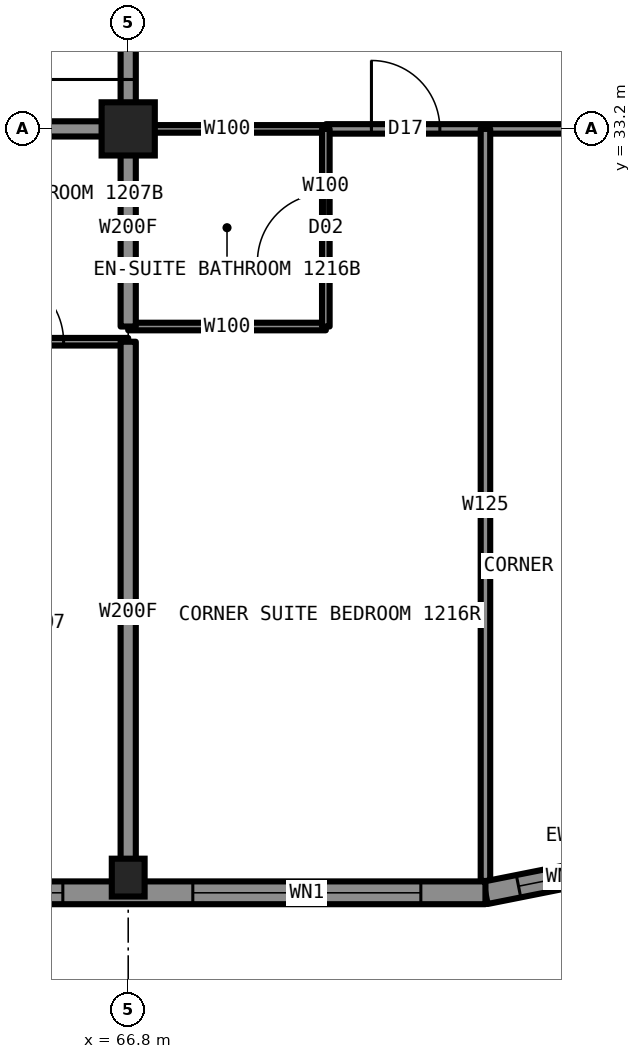
"""IFC4 building model, lengths in metres.
Left out: names, types, materials, properties, quantities, classifications, styles, units other than length and angle.
Written with IfcOpenShell. Run it as: python <this file> out.ifc"""

import sys

from ifc_helpers import new_model, si_unit, direction, frame, frame_2d, origin, origin_2d, place, context, subcontext, project, spatial, rectangle, hollow_rectangle, i_section, extrude, element, fill, save


model = new_model("IFC4")
c1 = context("Model", 3, precision=1e-05, world=origin(), true_north=direction((0.0, 1.0)))
c2 = subcontext(c1, "Body", "Model", "MODEL_VIEW")
j1 = project(units=[si_unit("LENGTHUNIT", "METRE"), si_unit("PLANEANGLEUNIT", "RADIAN")], contexts=[c1])
p1 = place(None, origin())
s1 = spatial("IfcSite", under=j1, at=p1, CompositionType="ELEMENT")
p2 = place(p1, origin())
s2 = spatial("IfcBuilding", under=s1, at=p2, CompositionType="ELEMENT")
p3 = place(p2, frame((0.0, 0.0, 49.5)))
s3 = spatial("IfcBuildingStorey", under=s2, at=p3, CompositionType="ELEMENT", Elevation=49.5)
p4 = place(p3, frame((66.8, 23.35, 0.0), z_axis=(0.0, 0.0, 1.0), x_axis=(1.0, 0.0, 0.0)))
e1 = element("IfcColumn", 1, at=p4, inside=s3, PredefinedType="COLUMN", context=c2, shape_type="SweptSolid", body=[
    extrude(i_section(OverallWidth=0.432, OverallDepth=0.498, WebThickness=0.056, FlangeThickness=0.089, at=origin_2d()), origin(), (0.0, 0.0, 1.0), 3.5),
])
p5 = place(p3, frame((66.8, 33.2, 0.0), z_axis=(0.0, 0.0, 1.0), x_axis=(1.0, 0.0, 0.0)))
e2 = element("IfcColumn", 2, at=p5, inside=s3, PredefinedType="COLUMN", context=c2, shape_type="SweptSolid", body=[
    extrude(hollow_rectangle(XDim=0.7, YDim=0.7, WallThickness=0.06, at=origin_2d()), origin(), (0.0, 0.0, 1.0), 3.5),
])
p6 = place(p3, frame((66.8, 33.2, 0.0), z_axis=(0.0, 0.0, 1.0), x_axis=(1.0, 0.0, 0.0)))
e3 = element("IfcWall", 3, at=p6, inside=s3, PredefinedType="PARTITIONING", context=c2, shape_type="SweptSolid", body=[
    extrude(rectangle(XDim=2.6, YDim=0.1, at=frame_2d((1.3, 0.0))), origin(), (0.0, 0.0, 1.0), 2.573),
])
p7 = place(p3, frame((43.2, 33.2, 0.0), z_axis=(0.0, 0.0, 1.0), x_axis=(1.0, 0.0, 0.0)))
e4 = element("IfcWall", 4, at=p7, inside=s3, PredefinedType="PARTITIONING", context=c2, shape_type="SweptSolid", body=[
    extrude(rectangle(XDim=23.6, YDim=0.2, at=frame_2d((11.8, 0.0))), origin(), (0.0, 0.0, 1.0), 3.33),
])
p8 = place(p7, frame((3.0, 0.0, 0.0)))
e5 = element("IfcOpeningElement", 5, at=p8, cuts=e4, PredefinedType="OPENING", context=c2, shape_type="SweptSolid", body=[
    extrude(rectangle(XDim=1.0, YDim=2.2, at=frame_2d((0.5, 1.1))), frame((0.0, 0.11, 0.0), z_axis=(0.0, -1.0, 0.0), x_axis=(1.0, 0.0, 0.0)), (0.0, 0.0, 1.0), 0.22),
])
p9 = place(p7, frame((12.44, 0.0, 0.0)))
e6 = element("IfcOpeningElement", 6, at=p9, cuts=e4, PredefinedType="OPENING", context=c2, shape_type="SweptSolid", body=[
    extrude(rectangle(XDim=1.0, YDim=2.2, at=frame_2d((0.5, 1.1))), frame((0.0, 0.11, 0.0), z_axis=(0.0, -1.0, 0.0), x_axis=(1.0, 0.0, 0.0)), (0.0, 0.0, 1.0), 0.22),
])
p10 = place(p7, frame((19.28, 0.0, 0.0)))
e7 = element("IfcOpeningElement", 7, at=p10, cuts=e4, PredefinedType="OPENING", context=c2, shape_type="SweptSolid", body=[
    extrude(rectangle(XDim=1.0, YDim=2.2, at=frame_2d((0.5, 1.1))), frame((0.0, 0.11, 0.0), z_axis=(0.0, -1.0, 0.0), x_axis=(1.0, 0.0, 0.0)), (0.0, 0.0, 1.0), 0.22),
])
p11 = place(p3, frame((69.4, 33.2, 0.0), z_axis=(0.0, 0.0, 1.0), x_axis=(1.0, 0.0, 0.0)))
e8 = element("IfcWall", 8, at=p11, inside=s3, PredefinedType="PARTITIONING", context=c2, shape_type="SweptSolid", body=[
    extrude(rectangle(XDim=7.3, YDim=0.125, at=frame_2d((3.65, 0.0))), origin(), (0.0, 0.0, 1.0), 2.573),
])
p12 = place(p11, frame((0.6, 0.0, 0.0)))
e9 = element("IfcOpeningElement", 9, at=p12, cuts=e8, PredefinedType="OPENING", context=c2, shape_type="SweptSolid", body=[
    extrude(rectangle(XDim=0.9, YDim=2.2, at=frame_2d((0.45, 1.1))), frame((0.0, 0.073, 0.0), z_axis=(0.0, -1.0, 0.0), x_axis=(1.0, 0.0, 0.0)), (0.0, 0.0, 1.0), 0.145),
])
p13 = place(p11, frame((4.4, 0.0, 0.0)))
e10 = element("IfcOpeningElement", 10, at=p13, cuts=e8, PredefinedType="OPENING", context=c2, shape_type="SweptSolid", body=[
    extrude(rectangle(XDim=0.9, YDim=2.2, at=frame_2d((0.45, 1.1))), frame((0.0, 0.073, 0.0), z_axis=(0.0, -1.0, 0.0), x_axis=(1.0, 0.0, 0.0)), (0.0, 0.0, 1.0), 0.145),
])
p14 = place(p3, frame((66.8, 30.6, 0.0), z_axis=(0.0, 0.0, 1.0), x_axis=(1.0, 0.0, 0.0)))
e11 = element("IfcWall", 11, at=p14, inside=s3, PredefinedType="PARTITIONING", context=c2, shape_type="SweptSolid", body=[
    extrude(rectangle(XDim=2.6, YDim=0.1, at=frame_2d((1.3, 0.0))), origin(), (0.0, 0.0, 1.0), 3.33),
])
p15 = place(p3, frame((64.2, 30.4, 0.0), z_axis=(0.0, 0.0, 1.0), x_axis=(1.0, 0.0, 0.0)))
e12 = element("IfcWall", 12, at=p15, inside=s3, PredefinedType="PARTITIONING", context=c2, shape_type="SweptSolid", body=[
    extrude(rectangle(XDim=2.6, YDim=0.1, at=frame_2d((1.3, 0.0))), origin(), (0.0, 0.0, 1.0), 3.33),
])
p16 = place(p15, frame((0.85, 0.0, 0.0)))
e13 = element("IfcOpeningElement", 13, at=p16, cuts=e12, PredefinedType="OPENING", context=c2, shape_type="SweptSolid", body=[
    extrude(rectangle(XDim=0.9, YDim=2.1, at=frame_2d((0.45, 1.05))), frame((0.0, 0.06, 0.0), z_axis=(0.0, -1.0, 0.0), x_axis=(1.0, 0.0, 0.0)), (0.0, 0.0, 1.0), 0.12),
])
p17 = place(p3, frame((66.8, 33.2, 0.0), z_axis=(0.0, 0.0, 1.0), x_axis=(0.0, 1.0, 0.0)))
e14 = element("IfcWall", 14, at=p17, inside=s3, PredefinedType="PARTITIONING", context=c2, shape_type="SweptSolid", body=[
    extrude(rectangle(XDim=4.72, YDim=0.2, at=frame_2d((2.36, 0.0))), origin(), (0.0, 0.0, 1.0), 3.33),
])
p18 = place(p17, frame((0.65, 0.0, 0.0)))
e15 = element("IfcOpeningElement", 15, at=p18, cuts=e14, PredefinedType="OPENING", context=c2, shape_type="SweptSolid", body=[
    extrude(rectangle(XDim=1.1, YDim=2.2, at=frame_2d((0.55, 1.1))), frame((0.0, 0.11, 0.0), z_axis=(0.0, -1.0, 0.0), x_axis=(1.0, 0.0, 0.0)), (0.0, 0.0, 1.0), 0.22),
])
p19 = place(p3, frame((66.8, 23.3, 0.0), z_axis=(0.0, 0.0, 1.0), x_axis=(0.0, 1.0, 0.0)))
e16 = element("IfcWall", 16, at=p19, inside=s3, PredefinedType="PARTITIONING", context=c2, shape_type="SweptSolid", body=[
    extrude(rectangle(XDim=7.1, YDim=0.2, at=frame_2d((3.55, 0.0))), origin(), (0.0, 0.0, 1.0), 2.573),
])
p20 = place(p3, frame((66.8, 30.6, 0.0), z_axis=(0.0, 0.0, 1.0), x_axis=(0.0, 1.0, 0.0)))
e17 = element("IfcWall", 17, at=p20, inside=s3, PredefinedType="PARTITIONING", context=c2, shape_type="SweptSolid", body=[
    extrude(rectangle(XDim=2.6, YDim=0.2, at=frame_2d((1.3, 0.0))), origin(), (0.0, 0.0, 1.0), 2.573),
])
p21 = place(p3, frame((69.4, 30.6, 0.0), z_axis=(0.0, 0.0, 1.0), x_axis=(0.0, 1.0, 0.0)))
e18 = element("IfcWall", 18, at=p21, inside=s3, PredefinedType="PARTITIONING", context=c2, shape_type="SweptSolid", body=[
    extrude(rectangle(XDim=2.6, YDim=0.1, at=frame_2d((1.3, 0.0))), origin(), (0.0, 0.0, 1.0), 3.33),
])
p22 = place(p21, frame((0.85, 0.0, 0.0)))
e19 = element("IfcOpeningElement", 19, at=p22, cuts=e18, PredefinedType="OPENING", context=c2, shape_type="SweptSolid", body=[
    extrude(rectangle(XDim=0.9, YDim=2.1, at=frame_2d((0.45, 1.05))), frame((0.0, 0.06, 0.0), z_axis=(0.0, -1.0, 0.0), x_axis=(1.0, 0.0, 0.0)), (0.0, 0.0, 1.0), 0.12),
])
p23 = place(p3, frame((71.5, 23.306, 0.0), z_axis=(0.0, 0.0, 1.0), x_axis=(0.0, 1.0, 0.0)))
e20 = element("IfcWall", 20, at=p23, inside=s3, PredefinedType="PARTITIONING", context=c2, shape_type="SweptSolid", body=[
    extrude(rectangle(XDim=9.894, YDim=0.125, at=frame_2d((4.947, 0.0))), origin(), (0.0, 0.0, 1.0), 3.33),
])
p24 = place(p3, frame((71.5, 23.15, 0.0), z_axis=(0.0, 0.0, 1.0), x_axis=(0.980787050784, 0.195081421501, 0.0)))
e21 = element("IfcWall", 21, at=p24, inside=s3, PredefinedType="SOLIDWALL", context=c2, shape_type="SweptSolid", body=[
    extrude(rectangle(XDim=2.087, YDim=0.3, at=frame_2d((1.044, 0.0))), origin(), (0.0, 0.0, 1.0), 3.33),
])
p25 = place(p24, frame((0.444, 0.0, 0.5)))
e22 = element("IfcOpeningElement", 22, at=p25, cuts=e21, PredefinedType="OPENING", context=c2, shape_type="SweptSolid", body=[
    extrude(rectangle(XDim=1.2, YDim=2.0, at=frame_2d((0.6, 1.0))), frame((0.0, 0.16, 0.0), z_axis=(0.0, -1.0, 0.0), x_axis=(1.0, 0.0, 0.0)), (0.0, 0.0, 1.0), 0.32),
])
p26 = place(p3, frame((38.5, 23.15, 0.0), z_axis=(0.0, 0.0, 1.0), x_axis=(1.0, 0.0, 0.0)))
e23 = element("IfcWall", 23, at=p26, inside=s3, PredefinedType="SOLIDWALL", context=c2, shape_type="SweptSolid", body=[
    extrude(rectangle(XDim=33.0, YDim=0.3, at=frame_2d((16.5, 0.0))), origin(), (0.0, 0.0, 1.0), 2.83),
])
p27 = place(p26, frame((0.85, 0.0, 0.5)))
e24 = element("IfcOpeningElement", 24, at=p27, cuts=e23, PredefinedType="OPENING", context=c2, shape_type="SweptSolid", body=[
    extrude(rectangle(XDim=3.0, YDim=2.0, at=frame_2d((1.5, 1.0))), frame((0.0, 0.16, 0.0), z_axis=(0.0, -1.0, 0.0), x_axis=(1.0, 0.0, 0.0)), (0.0, 0.0, 1.0), 0.32),
])
p28 = place(p26, frame((5.56, 0.0, 0.5)))
e25 = element("IfcOpeningElement", 25, at=p28, cuts=e23, PredefinedType="OPENING", context=c2, shape_type="SweptSolid", body=[
    extrude(rectangle(XDim=3.0, YDim=2.0, at=frame_2d((1.5, 1.0))), frame((0.0, 0.16, 0.0), z_axis=(0.0, -1.0, 0.0), x_axis=(1.0, 0.0, 0.0)), (0.0, 0.0, 1.0), 0.32),
])
p29 = place(p26, frame((10.28, 0.0, 1.1)))
e26 = element("IfcOpeningElement", 26, at=p29, cuts=e23, PredefinedType="OPENING", context=c2, shape_type="SweptSolid", body=[
    extrude(rectangle(XDim=1.1, YDim=1.4, at=frame_2d((0.55, 0.7))), frame((0.0, 0.16, 0.0), z_axis=(0.0, -1.0, 0.0), x_axis=(1.0, 0.0, 0.0)), (0.0, 0.0, 1.0), 0.32),
])
p30 = place(p26, frame((15.0, 0.0, 0.5)))
e27 = element("IfcOpeningElement", 27, at=p30, cuts=e23, PredefinedType="OPENING", context=c2, shape_type="SweptSolid", body=[
    extrude(rectangle(XDim=3.0, YDim=2.0, at=frame_2d((1.5, 1.0))), frame((0.0, 0.16, 0.0), z_axis=(0.0, -1.0, 0.0), x_axis=(1.0, 0.0, 0.0)), (0.0, 0.0, 1.0), 0.32),
])
p31 = place(p26, frame((21.62, 0.0, 1.1)))
e28 = element("IfcOpeningElement", 28, at=p31, cuts=e23, PredefinedType="OPENING", context=c2, shape_type="SweptSolid", body=[
    extrude(rectangle(XDim=1.1, YDim=1.4, at=frame_2d((0.55, 0.7))), frame((0.0, 0.16, 0.0), z_axis=(0.0, -1.0, 0.0), x_axis=(1.0, 0.0, 0.0)), (0.0, 0.0, 1.0), 0.32),
])
p32 = place(p26, frame((24.44, 0.0, 0.5)))
e29 = element("IfcOpeningElement", 29, at=p32, cuts=e23, PredefinedType="OPENING", context=c2, shape_type="SweptSolid", body=[
    extrude(rectangle(XDim=3.0, YDim=2.0, at=frame_2d((1.5, 1.0))), frame((0.0, 0.16, 0.0), z_axis=(0.0, -1.0, 0.0), x_axis=(1.0, 0.0, 0.0)), (0.0, 0.0, 1.0), 0.32),
])
p33 = place(p26, frame((29.15, 0.0, 0.5)))
e30 = element("IfcOpeningElement", 30, at=p33, cuts=e23, PredefinedType="OPENING", context=c2, shape_type="SweptSolid", body=[
    extrude(rectangle(XDim=3.0, YDim=2.0, at=frame_2d((1.5, 1.0))), frame((0.0, 0.16, 0.0), z_axis=(0.0, -1.0, 0.0), x_axis=(1.0, 0.0, 0.0)), (0.0, 0.0, 1.0), 0.32),
])
p34 = place(p16, origin())
e31 = element("IfcDoor", 31, at=p34, inside=s3, OperationType="SINGLE_SWING_RIGHT", PredefinedType="DOOR", context=c2, shape_type="SweptSolid", body=[
    extrude(rectangle(XDim=0.9, YDim=2.1, at=frame_2d((0.45, 1.05))), frame((0.0, 0.025, 0.0), z_axis=(0.0, -1.0, 0.0), x_axis=(1.0, 0.0, 0.0)), (0.0, 0.0, 1.0), 0.05),
])
fill(e13, e31)
p35 = place(p18, origin())
e32 = element("IfcDoor", 32, at=p35, inside=s3, OperationType="SINGLE_SWING_LEFT", PredefinedType="DOOR", context=c2, shape_type="SweptSolid", body=[
    extrude(rectangle(XDim=1.1, YDim=2.2, at=frame_2d((0.55, 1.1))), frame((0.0, 0.025, 0.0), z_axis=(0.0, -1.0, 0.0), x_axis=(1.0, 0.0, 0.0)), (0.0, 0.0, 1.0), 0.05),
])
fill(e15, e32)
p36 = place(p22, origin())
e33 = element("IfcDoor", 33, at=p36, inside=s3, OperationType="SINGLE_SWING_RIGHT", PredefinedType="DOOR", context=c2, shape_type="SweptSolid", body=[
    extrude(rectangle(XDim=0.9, YDim=2.1, at=frame_2d((0.45, 1.05))), frame((0.0, 0.025, 0.0), z_axis=(0.0, -1.0, 0.0), x_axis=(1.0, 0.0, 0.0)), (0.0, 0.0, 1.0), 0.05),
])
fill(e19, e33)
p37 = place(p12, origin())
e34 = element("IfcDoor", 34, at=p37, inside=s3, OperationType="SINGLE_SWING_LEFT", PredefinedType="DOOR", context=c2, shape_type="SweptSolid", body=[
    extrude(rectangle(XDim=0.9, YDim=2.2, at=frame_2d((0.45, 1.1))), frame((0.0, 0.025, 0.0), z_axis=(0.0, -1.0, 0.0), x_axis=(1.0, 0.0, 0.0)), (0.0, 0.0, 1.0), 0.05),
])
fill(e9, e34)
p38 = place(p25, origin())
e35 = element("IfcWindow", 35, at=p38, inside=s3, PartitioningType="SINGLE_PANEL", PredefinedType="WINDOW", context=c2, shape_type="SweptSolid", body=[
    extrude(rectangle(XDim=1.2, YDim=2.0, at=frame_2d((0.6, 1.0))), frame((0.0, 0.03, 0.0), z_axis=(0.0, -1.0, 0.0), x_axis=(1.0, 0.0, 0.0)), (0.0, 0.0, 1.0), 0.06),
])
fill(e22, e35)
p39 = place(p32, origin())
e36 = element("IfcWindow", 36, at=p39, inside=s3, PartitioningType="SINGLE_PANEL", PredefinedType="WINDOW", context=c2, shape_type="SweptSolid", body=[
    extrude(rectangle(XDim=3.0, YDim=2.0, at=frame_2d((1.5, 1.0))), frame((0.0, 0.03, 0.0), z_axis=(0.0, -1.0, 0.0), x_axis=(1.0, 0.0, 0.0)), (0.0, 0.0, 1.0), 0.06),
])
fill(e29, e36)
p40 = place(p33, origin())
e37 = element("IfcWindow", 37, at=p40, inside=s3, PartitioningType="SINGLE_PANEL", PredefinedType="WINDOW", context=c2, shape_type="SweptSolid", body=[
    extrude(rectangle(XDim=3.0, YDim=2.0, at=frame_2d((1.5, 1.0))), frame((0.0, 0.03, 0.0), z_axis=(0.0, -1.0, 0.0), x_axis=(1.0, 0.0, 0.0)), (0.0, 0.0, 1.0), 0.06),
])
fill(e30, e37)
save(model, sys.argv[1])
